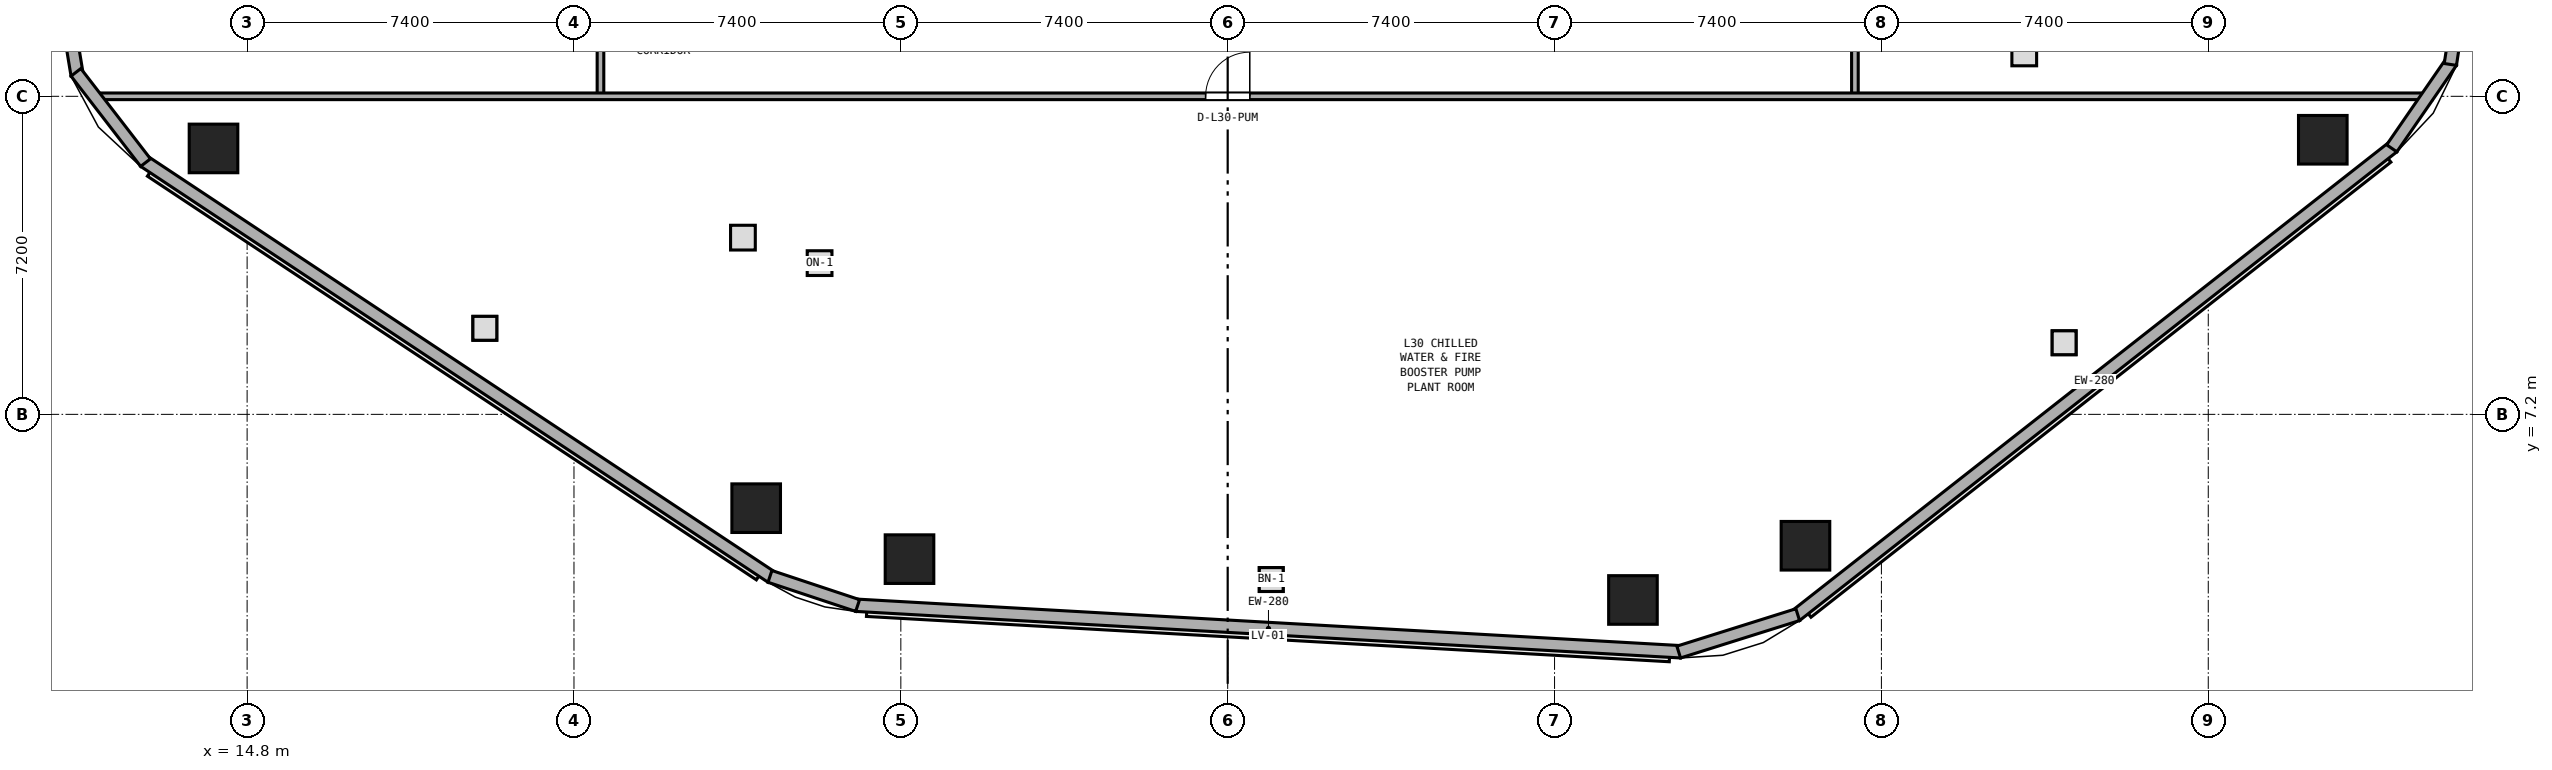
"""IFC4 building model, lengths in metres.
Left out: names, types, materials, properties, quantities, classifications, styles, units other than length and angle.
Written with IfcOpenShell. Run it as: python <this file> out.ifc"""

import sys

from ifc_helpers import new_model, si_unit, direction, frame, frame_2d, origin, origin_2d, place, context, subcontext, project, spatial, rectangle, extrude, element, fill, save


model = new_model("IFC4")
c1 = context("Model", 3, precision=1e-05, world=origin(), true_north=direction((0.0, 1.0)))
c2 = subcontext(c1, "Body", "Model", "MODEL_VIEW")
j1 = project(units=[si_unit("LENGTHUNIT", "METRE"), si_unit("PLANEANGLEUNIT", "RADIAN")], contexts=[c1])
p1 = place(None, origin())
s1 = spatial("IfcSite", under=j1, at=p1, CompositionType="ELEMENT")
p2 = place(p1, origin())
s2 = spatial("IfcBuilding", under=s1, at=p2, CompositionType="ELEMENT")
p3 = place(p2, frame((0.0, 0.0, 120.0)))
s3 = spatial("IfcBuildingStorey", under=s2, at=p3, CompositionType="ELEMENT", Elevation=120.0)
for number, where, z_axis, x_axis in (
    (1, (29.796, 3.922, 0.0), (0.0, 0.0, 1.0), (1.0, 0.0, 0.0)),
    (2, (46.175, 2.998, 0.0), (0.0, 0.0, 1.0), (1.0, 0.0, 0.0)),
    (3, (50.081, 4.225, 0.0), (0.0, 0.0, 1.0), (1.0, 0.0, 0.0)),
    (4, (61.793, 13.416, 0.0), (0.0, 0.0, 1.0), (1.0, 0.0, 0.0)),
    (5, (14.039, 13.22, 0.0), (0.0, 0.0, 1.0), (1.0, 0.0, 0.0)),
    (6, (26.325, 5.076, 0.0), (0.0, 0.0, 1.0), (1.0, 0.0, 0.0)),
):
    element("IfcColumn", number, at=place(p3, frame(where, z_axis=z_axis, x_axis=x_axis)), inside=s3, PredefinedType="COLUMN", context=c2, shape_type="SweptSolid", body=[
        extrude(rectangle(XDim=1.1, YDim=1.1, at=origin_2d()), origin(), (0.0, 0.0, 1.0), 5.0),
    ])
p4 = place(p3, frame((51.2, 14.4, 0.0), z_axis=(0.0, 0.0, 1.0), x_axis=(0.0, 1.0, 0.0)))
e7 = element("IfcWall", 7, at=p4, inside=s3, PredefinedType="PARTITIONING", context=c2, shape_type="SweptSolid", body=[
    extrude(rectangle(XDim=21.6, YDim=0.15, at=frame_2d((10.8, 0.0))), origin(), (0.0, 0.0, 1.0), 4.6),
])
p5 = place(p4, frame((10.2, 0.0, 0.0)))
e8 = element("IfcOpeningElement", 8, at=p5, cuts=e7, PredefinedType="OPENING", context=c2, shape_type="SweptSolid", body=[
    extrude(rectangle(XDim=1.2, YDim=2.15, at=frame_2d((0.6, 1.075))), frame((0.0, 0.085, 0.0), z_axis=(0.0, -1.0, 0.0), x_axis=(1.0, 0.0, 0.0)), (0.0, 0.0, 1.0), 0.17),
])
p6 = place(p3, frame((22.8, 14.4, 0.0), z_axis=(0.0, 0.0, 1.0), x_axis=(0.0, 1.0, 0.0)))
e9 = element("IfcWall", 9, at=p6, inside=s3, PredefinedType="PARTITIONING", context=c2, shape_type="SweptSolid", body=[
    extrude(rectangle(XDim=21.6, YDim=0.15, at=frame_2d((10.8, 0.0))), origin(), (0.0, 0.0, 1.0), 4.6),
])
p7 = place(p6, frame((10.3, 0.0, 0.0)))
e10 = element("IfcOpeningElement", 10, at=p7, cuts=e9, PredefinedType="OPENING", context=c2, shape_type="SweptSolid", body=[
    extrude(rectangle(XDim=1.0, YDim=2.04, at=frame_2d((0.5, 1.02))), frame((0.0, 0.085, 0.0), z_axis=(0.0, -1.0, 0.0), x_axis=(1.0, 0.0, 0.0)), (0.0, 0.0, 1.0), 0.17),
])
p8 = place(p3, frame((11.264, 14.4, 0.0), z_axis=(0.0, 0.0, 1.0), x_axis=(1.0, 0.0, 0.0)))
e11 = element("IfcWall", 11, at=p8, inside=s3, PredefinedType="PARTITIONING", context=c2, shape_type="SweptSolid", body=[
    extrude(rectangle(XDim=53.009, YDim=0.15, at=frame_2d((26.504, 0.0))), origin(), (0.0, 0.0, 1.0), 2.2),
])
p9 = place(p8, frame((25.236, 0.0, 0.0)))
e12 = element("IfcOpeningElement", 12, at=p9, cuts=e11, PredefinedType="OPENING", context=c2, shape_type="SweptSolid", body=[
    extrude(rectangle(XDim=1.0, YDim=2.04, at=frame_2d((0.5, 1.02))), frame((0.0, 0.085, 0.0), z_axis=(0.0, -1.0, 0.0), x_axis=(1.0, 0.0, 0.0)), (0.0, 0.0, 1.0), 0.17),
])
p10 = place(p3, frame((28.586, 2.879, 0.0), z_axis=(0.0, 0.0, 1.0), x_axis=(0.998411252876, -0.056346873291, 0.0)))
e13 = element("IfcWall", 13, at=p10, inside=s3, PredefinedType="STANDARD", context=c2, shape_type="SweptSolid", body=[
    extrude(rectangle(XDim=18.705, YDim=0.28, at=frame_2d((9.353, 0.0))), origin(), (0.0, 0.0, 1.0), 4.6),
])
p11 = place(p3, frame((49.861, 2.642, 0.0), z_axis=(0.0, 0.0, 1.0), x_axis=(0.786701650025, 0.617333389546, 0.0)))
e14 = element("IfcWall", 14, at=p11, inside=s3, PredefinedType="STANDARD", context=c2, shape_type="SweptSolid", body=[
    extrude(rectangle(XDim=17.188, YDim=0.28, at=frame_2d((8.594, 0.0))), origin(), (0.0, 0.0, 1.0), 4.6),
])
p12 = place(p3, frame((12.467, 12.93, 0.0), z_axis=(0.0, 0.0, 1.0), x_axis=(0.833508797991, -0.552506184284, 0.0)))
e15 = element("IfcWall", 15, at=p12, inside=s3, PredefinedType="STANDARD", context=c2, shape_type="SweptSolid", body=[
    extrude(rectangle(XDim=17.04, YDim=0.28, at=frame_2d((8.52, 0.0))), origin(), (0.0, 0.0, 1.0), 4.6),
])
p13 = place(p3, frame((47.211, 1.819, 0.0), z_axis=(0.0, 0.0, 1.0), x_axis=(0.953995835848, 0.299819854553, 0.0)))
e16 = element("IfcWall", 16, at=p13, inside=s3, PredefinedType="STANDARD", context=c2, shape_type="SweptSolid", body=[
    extrude(rectangle(XDim=2.825, YDim=0.28, at=frame_2d((1.412, 0.0))), origin(), (0.0, 0.0, 1.0), 4.6),
])
p14 = place(p3, frame((63.354, 13.222, 0.0), z_axis=(0.0, 0.0, 1.0), x_axis=(0.567639386418, 0.82327730868, 0.0)))
e17 = element("IfcWall", 17, at=p14, inside=s3, PredefinedType="STANDARD", context=c2, shape_type="SweptSolid", body=[
    extrude(rectangle(XDim=2.378, YDim=0.28, at=frame_2d((1.189, 0.0))), origin(), (0.0, 0.0, 1.0), 4.6),
])
p15 = place(p3, frame((64.681, 15.122, 0.0), z_axis=(0.0, 0.0, 1.0), x_axis=(0.150226326126, 0.98865163275, 0.0)))
e18 = element("IfcWall", 18, at=p15, inside=s3, PredefinedType="STANDARD", context=c2, shape_type="SweptSolid", body=[
    extrude(rectangle(XDim=1.203, YDim=0.28, at=frame_2d((0.601, 0.0))), origin(), (0.0, 0.0, 1.0), 4.6),
])
p16 = place(p3, frame((10.738, 16.17, 0.0), z_axis=(0.0, 0.0, 1.0), x_axis=(0.163490970766, -0.986544830445, 0.0)))
e19 = element("IfcWall", 19, at=p16, inside=s3, PredefinedType="STANDARD", context=c2, shape_type="SweptSolid", body=[
    extrude(rectangle(XDim=1.308, YDim=0.28, at=frame_2d((0.654, 0.0))), origin(), (0.0, 0.0, 1.0), 4.6),
])
p17 = place(p3, frame((10.925, 14.943, 0.0), z_axis=(0.0, 0.0, 1.0), x_axis=(0.610647549787, -0.791902500273, 0.0)))
e20 = element("IfcWall", 20, at=p17, inside=s3, PredefinedType="STANDARD", context=c2, shape_type="SweptSolid", body=[
    extrude(rectangle(XDim=2.581, YDim=0.28, at=frame_2d((1.291, 0.0))), origin(), (0.0, 0.0, 1.0), 4.6),
])
p18 = place(p3, frame((26.637, 3.531, 0.0), z_axis=(0.0, 0.0, 1.0), x_axis=(0.948951450177, -0.315422169809, 0.0)))
e21 = element("IfcWall", 21, at=p18, inside=s3, PredefinedType="STANDARD", context=c2, shape_type="SweptSolid", body=[
    extrude(rectangle(XDim=2.091, YDim=0.28, at=frame_2d((1.046, 0.0))), origin(), (0.0, 0.0, 1.0), 4.6),
])
p19 = place(p9, origin())
e22 = element("IfcDoor", 22, at=p19, inside=s3, OperationType="SINGLE_SWING_RIGHT", PredefinedType="DOOR", context=c2, shape_type="SweptSolid", body=[
    extrude(rectangle(XDim=1.0, YDim=2.04, at=frame_2d((0.5, 1.02))), frame((0.0, 0.025, 0.0), z_axis=(0.0, -1.0, 0.0), x_axis=(1.0, 0.0, 0.0)), (0.0, 0.0, 1.0), 0.05),
])
fill(e12, e22)
save(model, sys.argv[1])
